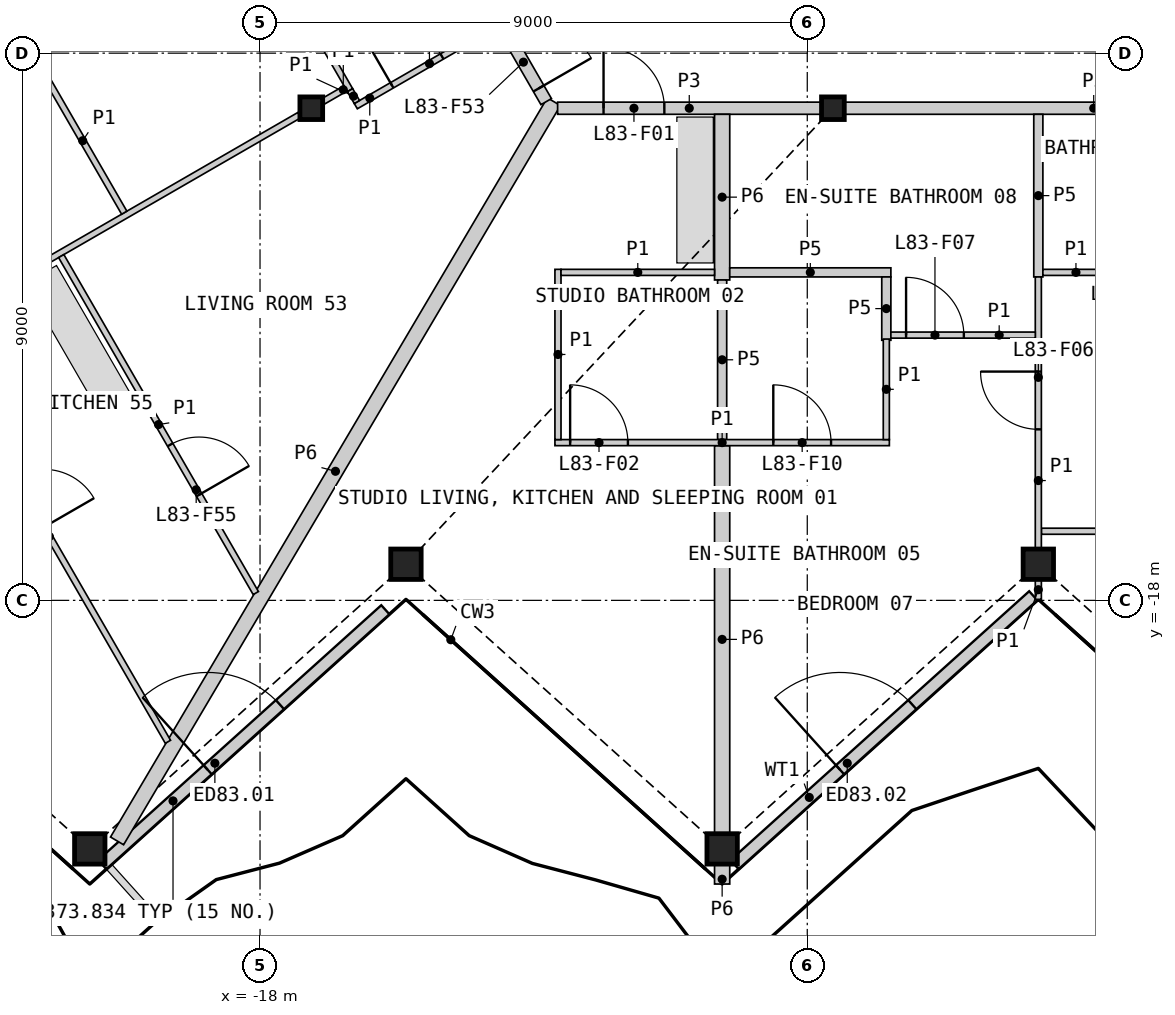
"""IFC4 building model, lengths in metres.
Left out: names, types, materials, properties, quantities, classifications, styles, units other than length and angle.
Written with IfcOpenShell. Run it as: python <this file> out.ifc"""

import sys

from ifc_helpers import new_model, si_unit, direction, frame, frame_2d, origin, origin_2d, place, context, subcontext, project, spatial, rectangle, hollow_rectangle, i_section, extrude, element, fill, save


model = new_model("IFC4")
c1 = context("Model", 3, precision=1e-05, world=origin(), true_north=direction((0.0, 1.0)))
c2 = subcontext(c1, "Body", "Model", "MODEL_VIEW")
j1 = project(units=[si_unit("LENGTHUNIT", "METRE"), si_unit("PLANEANGLEUNIT", "RADIAN")], contexts=[c1])
p1 = place(None, origin())
s1 = spatial("IfcSite", under=j1, at=p1, CompositionType="ELEMENT")
p2 = place(p1, origin())
s2 = spatial("IfcBuilding", under=s1, at=p2, CompositionType="ELEMENT")
p3 = place(p2, frame((0.0, 0.0, 371.2)))
s3 = spatial("IfcBuildingStorey", under=s2, at=p3, CompositionType="ELEMENT", Elevation=371.2)
for number, where, z_axis, x_axis in (
    (1, (-20.8, -22.088, 0.0), (0.0, 0.0, 1.0), (1.0, 0.0, 0.0)),
    (2, (-15.6, -17.406, 0.0), (0.0, 0.0, 1.0), (1.0, 0.0, 0.0)),
    (3, (-10.4, -22.088, 0.0), (0.0, 0.0, 1.0), (1.0, 0.0, 0.0)),
    (4, (-5.2, -17.406, 0.0), (0.0, 0.0, 1.0), (1.0, 0.0, 0.0)),
):
    element("IfcColumn", number, at=place(p3, frame(where, z_axis=z_axis, x_axis=x_axis)), inside=s3, PredefinedType="COLUMN", context=c2, shape_type="SweptSolid", body=[
        extrude(hollow_rectangle(XDim=0.5, YDim=0.5, WallThickness=0.03, at=origin_2d()), origin(), (0.0, 0.0, 1.0), 3.4),
    ])
for number, where, z_axis, x_axis in (
    (5, (-17.157, -9.906, 0.0), (0.0, 0.0, 1.0), (1.0, 0.0, 0.0)),
    (6, (-8.578, -9.906, 0.0), (0.0, 0.0, 1.0), (1.0, 0.0, 0.0)),
):
    element("IfcColumn", number, at=place(p3, frame(where, z_axis=z_axis, x_axis=x_axis)), inside=s3, PredefinedType="COLUMN", context=c2, shape_type="SweptSolid", body=[
        extrude(i_section(OverallWidth=0.374, OverallDepth=0.372, WebThickness=0.016, FlangeThickness=0.026, at=origin_2d()), origin(), (0.0, 0.0, 1.0), 3.4),
    ])
p4 = place(p3, frame((-20.595, -22.346, 0.0), z_axis=(0.0, 0.0, 1.0), x_axis=(0.743137181878, 0.669139095339, 0.0)))
e7 = element("IfcWall", 7, at=p4, inside=s3, PredefinedType="SOLIDWALL", context=c2, shape_type="SweptSolid", body=[
    extrude(rectangle(XDim=6.265, YDim=0.2, at=frame_2d((3.133, 0.0))), origin(), (0.0, 0.0, 1.0), 2.634),
])
p5 = place(p4, frame((2.333, 0.0, 0.0)))
e8 = element("IfcOpeningElement", 8, at=p5, cuts=e7, PredefinedType="OPENING", context=c2, shape_type="SweptSolid", body=[
    extrude(rectangle(XDim=1.6, YDim=2.25, at=frame_2d((0.8, 1.125))), frame((0.0, 0.11, 0.0), z_axis=(0.0, -1.0, 0.0), x_axis=(1.0, 0.0, 0.0)), (0.0, 0.0, 1.0), 0.22),
])
p6 = place(p3, frame((-10.195, -22.346, 0.0), z_axis=(0.0, 0.0, 1.0), x_axis=(0.74313432117, 0.66914227239, 0.0)))
e9 = element("IfcWall", 9, at=p6, inside=s3, PredefinedType="SOLIDWALL", context=c2, shape_type="SweptSolid", body=[
    extrude(rectangle(XDim=6.609, YDim=0.2, at=frame_2d((3.304, 0.0))), origin(), (0.0, 0.0, 1.0), 2.634),
])
p7 = place(p6, frame((2.333, 0.0, 0.0)))
e10 = element("IfcOpeningElement", 10, at=p7, cuts=e9, PredefinedType="OPENING", context=c2, shape_type="SweptSolid", body=[
    extrude(rectangle(XDim=1.6, YDim=2.25, at=frame_2d((0.8, 1.125))), frame((0.0, 0.11, 0.0), z_axis=(0.0, -1.0, 0.0), x_axis=(1.0, 0.0, 0.0)), (0.0, 0.0, 1.0), 0.22),
])
p8 = place(p3, frame((-20.351, -21.956, 0.0), z_axis=(0.0, 0.0, 1.0), x_axis=(0.508713003719, 0.860936164793, 0.0)))
e11 = element("IfcWall", 11, at=p8, inside=s3, PredefinedType="PARTITIONING", context=c2, shape_type="SweptSolid", body=[
    extrude(rectangle(XDim=14.122, YDim=0.25, at=frame_2d((7.061, 0.0))), origin(), (0.0, 0.0, 1.0), 2.33),
])
p9 = place(p3, frame((-8.382, -9.906, 0.0), z_axis=(0.0, 0.0, 1.0), x_axis=(1.0, 0.0, 0.0)))
e12 = element("IfcWall", 12, at=p9, inside=s3, PredefinedType="PARTITIONING", context=c2, shape_type="SweptSolid", body=[
    extrude(rectangle(XDim=8.185, YDim=0.2, at=frame_2d((4.092, 0.0))), origin(), (0.0, 0.0, 1.0), 3.1),
])
p10 = place(p9, frame((6.023, 0.0, 0.0)))
e13 = element("IfcOpeningElement", 13, at=p10, cuts=e12, PredefinedType="OPENING", context=c2, shape_type="SweptSolid", body=[
    extrude(rectangle(XDim=1.0, YDim=2.1, at=frame_2d((0.5, 1.05))), frame((0.0, 0.11, 0.0), z_axis=(0.0, -1.0, 0.0), x_axis=(1.0, 0.0, 0.0)), (0.0, 0.0, 1.0), 0.22),
])
p11 = place(p3, frame((-10.4, -21.828, 0.0), z_axis=(0.0, 0.0, 1.0), x_axis=(0.0, 1.0, 0.0)))
e14 = element("IfcWall", 14, at=p11, inside=s3, PredefinedType="PARTITIONING", context=c2, shape_type="SweptSolid", body=[
    extrude(rectangle(XDim=6.372, YDim=0.25, at=frame_2d((3.186, 0.0))), origin(), (0.0, 0.0, 1.0), 2.33),
])
p12 = place(p3, frame((-13.106, -9.906, 0.0), z_axis=(0.0, 0.0, 1.0), x_axis=(1.0, 0.0, 0.0)))
e15 = element("IfcWall", 15, at=p12, inside=s3, PredefinedType="PARTITIONING", context=c2, shape_type="SweptSolid", body=[
    extrude(rectangle(XDim=4.331, YDim=0.2, at=frame_2d((2.165, 0.0))), origin(), (0.0, 0.0, 1.0), 3.1),
])
p13 = place(p12, frame((0.755, 0.0, 0.0)))
e16 = element("IfcOpeningElement", 16, at=p13, cuts=e15, PredefinedType="OPENING", context=c2, shape_type="SweptSolid", body=[
    extrude(rectangle(XDim=1.0, YDim=2.1, at=frame_2d((0.5, 1.05))), frame((0.0, 0.11, 0.0), z_axis=(0.0, -1.0, 0.0), x_axis=(1.0, 0.0, 0.0)), (0.0, 0.0, 1.0), 0.22),
])
p14 = place(p3, frame((-15.131, -6.614, 0.0), z_axis=(0.0, 0.0, 1.0), x_axis=(0.499967746641, -0.866044024469, 0.0)))
e17 = element("IfcWall", 17, at=p14, inside=s3, PredefinedType="PARTITIONING", context=c2, shape_type="SweptSolid", body=[
    extrude(rectangle(XDim=3.676, YDim=0.2, at=frame_2d((1.838, 0.0))), origin(), (0.0, 0.0, 1.0), 3.1),
])
p15 = place(p14, frame((2.426, 0.0, 0.0)))
e18 = element("IfcOpeningElement", 18, at=p15, cuts=e17, PredefinedType="OPENING", context=c2, shape_type="SweptSolid", body=[
    extrude(rectangle(XDim=1.0, YDim=2.1, at=frame_2d((0.5, 1.05))), frame((0.0, 0.11, 0.0), z_axis=(0.0, -1.0, 0.0), x_axis=(1.0, 0.0, 0.0)), (0.0, 0.0, 1.0), 0.22),
])
p16 = place(p3, frame((-10.4, -12.731, 0.0), z_axis=(0.0, 0.0, 1.0), x_axis=(0.0, 1.0, 0.0)))
e19 = element("IfcWall", 19, at=p16, inside=s3, PredefinedType="PARTITIONING", context=c2, shape_type="SweptSolid", body=[
    extrude(rectangle(XDim=2.725, YDim=0.25, at=frame_2d((1.363, 0.0))), origin(), (0.0, 0.0, 1.0), 2.33),
])
p17 = place(p3, frame((-10.4, -22.666, 0.0), z_axis=(0.0, 0.0, 1.0), x_axis=(0.0, 1.0, 0.0)))
e20 = element("IfcWall", 20, at=p17, inside=s3, PredefinedType="PARTITIONING", context=c2, shape_type="SweptSolid", body=[
    extrude(rectangle(XDim=0.318, YDim=0.25, at=frame_2d((0.159, 0.0))), origin(), (0.0, 0.0, 1.0), 2.33),
])
p18 = place(p3, frame((-10.4, -15.356, 0.0), z_axis=(0.0, 0.0, 1.0), x_axis=(0.0, 1.0, 0.0)))
e21 = element("IfcWall", 21, at=p18, inside=s3, PredefinedType="PLUMBINGWALL", context=c2, shape_type="SweptSolid", body=[
    extrude(rectangle(XDim=2.625, YDim=0.15, at=frame_2d((1.312, 0.0))), origin(), (0.0, 0.0, 1.0), 2.33),
])
p19 = place(p3, frame((-5.2, -12.681, 0.0), z_axis=(0.0, 0.0, 1.0), x_axis=(0.0, 1.0, 0.0)))
e22 = element("IfcWall", 22, at=p19, inside=s3, PredefinedType="PLUMBINGWALL", context=c2, shape_type="SweptSolid", body=[
    extrude(rectangle(XDim=2.675, YDim=0.15, at=frame_2d((1.337, 0.0))), origin(), (0.0, 0.0, 1.0), 2.33),
])
p20 = place(p3, frame((-10.275, -12.606, 0.0), z_axis=(0.0, 0.0, 1.0), x_axis=(1.0, 0.0, 0.0)))
e23 = element("IfcWall", 23, at=p20, inside=s3, PredefinedType="PLUMBINGWALL", context=c2, shape_type="SweptSolid", body=[
    extrude(rectangle(XDim=2.65, YDim=0.15, at=frame_2d((1.325, 0.0))), origin(), (0.0, 0.0, 1.0), 2.33),
])
p21 = place(p3, frame((-7.7, -13.722, 0.0), z_axis=(0.0, 0.0, 1.0), x_axis=(0.0, 1.0, 0.0)))
e24 = element("IfcWall", 24, at=p21, inside=s3, PredefinedType="PLUMBINGWALL", context=c2, shape_type="SweptSolid", body=[
    extrude(rectangle(XDim=1.042, YDim=0.15, at=frame_2d((0.521, 0.0))), origin(), (0.0, 0.0, 1.0), 2.33),
])
p22 = place(p3, frame((-26.777, -15.46, 0.0), z_axis=(0.0, 0.0, 1.0), x_axis=(0.866019680922, 0.500009912158, 0.0)))
e25 = element("IfcWall", 25, at=p22, inside=s3, PredefinedType="PARTITIONING", context=c2, shape_type="SweptSolid", body=[
    extrude(rectangle(XDim=10.881, YDim=0.1, at=frame_2d((5.44, 0.0))), origin(), (0.0, 0.0, 1.0), 2.33),
])
p23 = place(p22, frame((1.454, 0.0, 0.0)))
e26 = element("IfcOpeningElement", 26, at=p23, cuts=e25, PredefinedType="OPENING", context=c2, shape_type="SweptSolid", body=[
    extrude(rectangle(XDim=0.95, YDim=2.1, at=frame_2d((0.475, 1.05))), frame((0.0, 0.06, 0.0), z_axis=(0.0, -1.0, 0.0), x_axis=(1.0, 0.0, 0.0)), (0.0, 0.0, 1.0), 0.12),
])
p24 = place(p3, frame((-23.413, -13.575, 0.0), z_axis=(0.0, 0.0, 1.0), x_axis=(0.499998958472, -0.86602600511, 0.0)))
e27 = element("IfcWall", 27, at=p24, inside=s3, PredefinedType="PARTITIONING", context=c2, shape_type="SweptSolid", body=[
    extrude(rectangle(XDim=7.796, YDim=0.1, at=frame_2d((3.898, 0.0))), origin(), (0.0, 0.0, 1.0), 2.33),
])
p25 = place(p24, frame((2.768, 0.0, 0.0)))
e28 = element("IfcOpeningElement", 28, at=p25, cuts=e27, PredefinedType="OPENING", context=c2, shape_type="SweptSolid", body=[
    extrude(rectangle(XDim=0.95, YDim=2.1, at=frame_2d((0.475, 1.05))), frame((0.0, 0.06, 0.0), z_axis=(0.0, -1.0, 0.0), x_axis=(1.0, 0.0, 0.0)), (0.0, 0.0, 1.0), 0.12),
])
p26 = place(p3, frame((-21.269, -12.337, 0.0), z_axis=(0.0, 0.0, 1.0), x_axis=(0.499983315828, -0.866035036182, 0.0)))
e29 = element("IfcWall", 29, at=p26, inside=s3, PredefinedType="PARTITIONING", context=c2, shape_type="SweptSolid", body=[
    extrude(rectangle(XDim=6.4, YDim=0.1, at=frame_2d((3.2, 0.0))), origin(), (0.0, 0.0, 1.0), 2.33),
])
p27 = place(p26, frame((3.584, 0.0, 0.0)))
e30 = element("IfcOpeningElement", 30, at=p27, cuts=e29, PredefinedType="OPENING", context=c2, shape_type="SweptSolid", body=[
    extrude(rectangle(XDim=0.95, YDim=2.1, at=frame_2d((0.475, 1.05))), frame((0.0, 0.06, 0.0), z_axis=(0.0, -1.0, 0.0), x_axis=(1.0, 0.0, 0.0)), (0.0, 0.0, 1.0), 0.12),
])
p28 = place(p3, frame((-13.15, -15.406, 0.0), z_axis=(0.0, 0.0, 1.0), x_axis=(1.0, 0.0, 0.0)))
e31 = element("IfcWall", 31, at=p28, inside=s3, PredefinedType="PARTITIONING", context=c2, shape_type="SweptSolid", body=[
    extrude(rectangle(XDim=5.5, YDim=0.1, at=frame_2d((2.75, 0.0))), origin(), (0.0, 0.0, 1.0), 2.33),
])
p29 = place(p28, frame((0.25, 0.0, 0.0)))
e32 = element("IfcOpeningElement", 32, at=p29, cuts=e31, PredefinedType="OPENING", context=c2, shape_type="SweptSolid", body=[
    extrude(rectangle(XDim=0.95, YDim=2.1, at=frame_2d((0.475, 1.05))), frame((0.0, 0.06, 0.0), z_axis=(0.0, -1.0, 0.0), x_axis=(1.0, 0.0, 0.0)), (0.0, 0.0, 1.0), 0.12),
])
p30 = place(p28, frame((3.591, 0.0, 0.0)))
e33 = element("IfcOpeningElement", 33, at=p30, cuts=e31, PredefinedType="OPENING", context=c2, shape_type="SweptSolid", body=[
    extrude(rectangle(XDim=0.95, YDim=2.1, at=frame_2d((0.475, 1.05))), frame((0.0, 0.06, 0.0), z_axis=(0.0, -1.0, 0.0), x_axis=(1.0, 0.0, 0.0)), (0.0, 0.0, 1.0), 0.12),
])
p31 = place(p3, frame((-5.15, -16.863, 0.0), z_axis=(0.0, 0.0, 1.0), x_axis=(1.0, 0.0, 0.0)))
e34 = element("IfcWall", 34, at=p31, inside=s3, PredefinedType="PARTITIONING", context=c2, shape_type="SweptSolid", body=[
    extrude(rectangle(XDim=5.1, YDim=0.1, at=frame_2d((2.55, 0.0))), origin(), (0.0, 0.0, 1.0), 2.33),
])
p32 = place(p31, frame((2.075, 0.0, 0.0)))
e35 = element("IfcOpeningElement", 35, at=p32, cuts=e34, PredefinedType="OPENING", context=c2, shape_type="SweptSolid", body=[
    extrude(rectangle(XDim=0.95, YDim=2.1, at=frame_2d((0.475, 1.05))), frame((0.0, 0.06, 0.0), z_axis=(0.0, -1.0, 0.0), x_axis=(1.0, 0.0, 0.0)), (0.0, 0.0, 1.0), 0.12),
])
p33 = place(p3, frame((-5.2, -17.146, 0.0), z_axis=(0.0, 0.0, 1.0), x_axis=(0.0, 1.0, 0.0)))
e36 = element("IfcWall", 36, at=p33, inside=s3, PredefinedType="PARTITIONING", context=c2, shape_type="SweptSolid", body=[
    extrude(rectangle(XDim=4.465, YDim=0.1, at=frame_2d((2.232, 0.0))), origin(), (0.0, 0.0, 1.0), 2.33),
])
p34 = place(p33, frame((1.958, 0.0, 0.0)))
e37 = element("IfcOpeningElement", 37, at=p34, cuts=e36, PredefinedType="OPENING", context=c2, shape_type="SweptSolid", body=[
    extrude(rectangle(XDim=0.95, YDim=2.1, at=frame_2d((0.475, 1.05))), frame((0.0, 0.06, 0.0), z_axis=(0.0, -1.0, 0.0), x_axis=(1.0, 0.0, 0.0)), (0.0, 0.0, 1.0), 0.12),
])
p35 = place(p3, frame((-21.6, -9.256, 0.0), z_axis=(0.0, 0.0, 1.0), x_axis=(0.500018733116, -0.866014587945, 0.0)))
e38 = element("IfcWall", 38, at=p35, inside=s3, PredefinedType="PARTITIONING", context=c2, shape_type="SweptSolid", body=[
    extrude(rectangle(XDim=2.734, YDim=0.1, at=frame_2d((1.367, 0.0))), origin(), (0.0, 0.0, 1.0), 2.33),
])
p36 = place(p3, frame((-13.1, -15.356, 0.0), z_axis=(0.0, 0.0, 1.0), x_axis=(0.0, 1.0, 0.0)))
e39 = element("IfcWall", 39, at=p36, inside=s3, PredefinedType="PARTITIONING", context=c2, shape_type="SweptSolid", body=[
    extrude(rectangle(XDim=2.8, YDim=0.1, at=frame_2d((1.4, 0.0))), origin(), (0.0, 0.0, 1.0), 2.33),
])
p37 = place(p3, frame((-13.05, -12.606, 0.0), z_axis=(0.0, 0.0, 1.0), x_axis=(1.0, 0.0, 0.0)))
e40 = element("IfcWall", 40, at=p37, inside=s3, PredefinedType="PARTITIONING", context=c2, shape_type="SweptSolid", body=[
    extrude(rectangle(XDim=2.525, YDim=0.1, at=frame_2d((1.263, 0.0))), origin(), (0.0, 0.0, 1.0), 2.33),
])
p38 = place(p3, frame((-16.425, -9.872, 0.0), z_axis=(0.0, 0.0, 1.0), x_axis=(0.86603978909, 0.499975083092, 0.0)))
e41 = element("IfcWall", 41, at=p38, inside=s3, PredefinedType="PARTITIONING", context=c2, shape_type="SweptSolid", body=[
    extrude(rectangle(XDim=2.649, YDim=0.1, at=frame_2d((1.325, 0.0))), origin(), (0.0, 0.0, 1.0), 2.33),
])
p39 = place(p38, frame((0.686, 0.0, 0.0)))
e42 = element("IfcOpeningElement", 42, at=p39, cuts=e41, PredefinedType="OPENING", context=c2, shape_type="SweptSolid", body=[
    extrude(rectangle(XDim=0.95, YDim=2.1, at=frame_2d((0.475, 1.05))), frame((0.0, 0.06, 0.0), z_axis=(0.0, -1.0, 0.0), x_axis=(1.0, 0.0, 0.0)), (0.0, 0.0, 1.0), 0.12),
])
p40 = place(p3, frame((-7.625, -13.637, 0.0), z_axis=(0.0, 0.0, 1.0), x_axis=(1.0, 0.0, 0.0)))
e43 = element("IfcWall", 43, at=p40, inside=s3, PredefinedType="PARTITIONING", context=c2, shape_type="SweptSolid", body=[
    extrude(rectangle(XDim=2.375, YDim=0.1, at=frame_2d((1.188, 0.0))), origin(), (0.0, 0.0, 1.0), 2.33),
])
p41 = place(p40, frame((0.25, 0.0, 0.0)))
e44 = element("IfcOpeningElement", 44, at=p41, cuts=e43, PredefinedType="OPENING", context=c2, shape_type="SweptSolid", body=[
    extrude(rectangle(XDim=0.95, YDim=2.1, at=frame_2d((0.475, 1.05))), frame((0.0, 0.06, 0.0), z_axis=(0.0, -1.0, 0.0), x_axis=(1.0, 0.0, 0.0)), (0.0, 0.0, 1.0), 0.12),
])
p42 = place(p3, frame((-5.125, -12.606, 0.0), z_axis=(0.0, 0.0, 1.0), x_axis=(1.0, 0.0, 0.0)))
e45 = element("IfcWall", 45, at=p42, inside=s3, PredefinedType="PARTITIONING", context=c2, shape_type="SweptSolid", body=[
    extrude(rectangle(XDim=2.175, YDim=0.1, at=frame_2d((1.087, 0.0))), origin(), (0.0, 0.0, 1.0), 2.33),
])
p43 = place(p42, frame((0.975, 0.0, 0.0)))
e46 = element("IfcOpeningElement", 46, at=p43, cuts=e45, PredefinedType="OPENING", context=c2, shape_type="SweptSolid", body=[
    extrude(rectangle(XDim=0.95, YDim=2.1, at=frame_2d((0.475, 1.05))), frame((0.0, 0.06, 0.0), z_axis=(0.0, -1.0, 0.0), x_axis=(1.0, 0.0, 0.0)), (0.0, 0.0, 1.0), 0.12),
])
p44 = place(p3, frame((-17.507, -7.899, 0.0), z_axis=(0.0, 0.0, 1.0), x_axis=(0.500011643316, -0.866018681408, 0.0)))
e47 = element("IfcWall", 47, at=p44, inside=s3, PredefinedType="PARTITIONING", context=c2, shape_type="SweptSolid", body=[
    extrude(rectangle(XDim=1.973, YDim=0.1, at=frame_2d((0.987, 0.0))), origin(), (0.0, 0.0, 1.0), 2.33),
])
p45 = place(p3, frame((-7.7, -15.356, 0.0), z_axis=(0.0, 0.0, 1.0), x_axis=(0.0, 1.0, 0.0)))
e48 = element("IfcWall", 48, at=p45, inside=s3, PredefinedType="PARTITIONING", context=c2, shape_type="SweptSolid", body=[
    extrude(rectangle(XDim=1.654, YDim=0.1, at=frame_2d((0.827, 0.0))), origin(), (0.0, 0.0, 1.0), 2.33),
])
p46 = place(p3, frame((-16.96, -9.792, 0.0), z_axis=(0.0, 0.0, 1.0), x_axis=(0.866137484628, 0.499805820016, 0.0)))
e49 = element("IfcWall", 49, at=p46, inside=s3, PredefinedType="PARTITIONING", context=c2, shape_type="SweptSolid", body=[
    extrude(rectangle(XDim=0.423, YDim=0.1, at=frame_2d((0.211, 0.0))), origin(), (0.0, 0.0, 1.0), 2.33),
])
p47 = place(p3, frame((-5.2, -17.983, 0.0), z_axis=(0.0, 0.0, 1.0), x_axis=(0.0, 1.0, 0.0)))
e50 = element("IfcWall", 50, at=p47, inside=s3, PredefinedType="PARTITIONING", context=c2, shape_type="SweptSolid", body=[
    extrude(rectangle(XDim=0.318, YDim=0.1, at=frame_2d((0.159, 0.0))), origin(), (0.0, 0.0, 1.0), 2.33),
])
p48 = place(p3, frame((-16.519, -9.61, 0.0), z_axis=(0.0, 0.0, 1.0), x_axis=(0.50245032488, -0.864606078528, 0.0)))
e51 = element("IfcWall", 51, at=p48, inside=s3, PredefinedType="PARTITIONING", context=c2, shape_type="SweptSolid", body=[
    extrude(rectangle(XDim=0.224, YDim=0.1, at=frame_2d((0.112, 0.0))), origin(), (0.0, 0.0, 1.0), 2.33),
])
p49 = place(p5, origin())
e52 = element("IfcDoor", 52, at=p49, inside=s3, OperationType="DOUBLE_DOOR_SINGLE_SWING", PredefinedType="DOOR", context=c2, shape_type="SweptSolid", body=[
    extrude(rectangle(XDim=1.6, YDim=2.25, at=frame_2d((0.8, 1.125))), frame((0.0, 0.025, 0.0), z_axis=(0.0, -1.0, 0.0), x_axis=(1.0, 0.0, 0.0)), (0.0, 0.0, 1.0), 0.05),
])
fill(e8, e52)
p50 = place(p7, origin())
e53 = element("IfcDoor", 53, at=p50, inside=s3, OperationType="DOUBLE_DOOR_SINGLE_SWING", PredefinedType="DOOR", context=c2, shape_type="SweptSolid", body=[
    extrude(rectangle(XDim=1.6, YDim=2.25, at=frame_2d((0.8, 1.125))), frame((0.0, 0.025, 0.0), z_axis=(0.0, -1.0, 0.0), x_axis=(1.0, 0.0, 0.0)), (0.0, 0.0, 1.0), 0.05),
])
fill(e10, e53)
p51 = place(p13, origin())
e54 = element("IfcDoor", 54, at=p51, inside=s3, OperationType="SINGLE_SWING_LEFT", PredefinedType="DOOR", context=c2, shape_type="SweptSolid", body=[
    extrude(rectangle(XDim=1.0, YDim=2.1, at=frame_2d((0.5, 1.05))), frame((0.0, 0.025, 0.0), z_axis=(0.0, -1.0, 0.0), x_axis=(1.0, 0.0, 0.0)), (0.0, 0.0, 1.0), 0.05),
])
fill(e16, e54)
p52 = place(p29, origin())
e55 = element("IfcDoor", 55, at=p52, inside=s3, OperationType="SINGLE_SWING_LEFT", PredefinedType="DOOR", context=c2, shape_type="SweptSolid", body=[
    extrude(rectangle(XDim=0.95, YDim=2.1, at=frame_2d((0.475, 1.05))), frame((0.0, 0.025, 0.0), z_axis=(0.0, -1.0, 0.0), x_axis=(1.0, 0.0, 0.0)), (0.0, 0.0, 1.0), 0.05),
])
fill(e32, e55)
p53 = place(p34, origin())
e56 = element("IfcDoor", 56, at=p53, inside=s3, OperationType="SINGLE_SWING_RIGHT", PredefinedType="DOOR", context=c2, shape_type="SweptSolid", body=[
    extrude(rectangle(XDim=0.95, YDim=2.1, at=frame_2d((0.475, 1.05))), frame((0.0, 0.025, 0.0), z_axis=(0.0, -1.0, 0.0), x_axis=(1.0, 0.0, 0.0)), (0.0, 0.0, 1.0), 0.05),
])
fill(e37, e56)
p54 = place(p41, origin())
e57 = element("IfcDoor", 57, at=p54, inside=s3, OperationType="SINGLE_SWING_LEFT", PredefinedType="DOOR", context=c2, shape_type="SweptSolid", body=[
    extrude(rectangle(XDim=0.95, YDim=2.1, at=frame_2d((0.475, 1.05))), frame((0.0, 0.025, 0.0), z_axis=(0.0, -1.0, 0.0), x_axis=(1.0, 0.0, 0.0)), (0.0, 0.0, 1.0), 0.05),
])
fill(e44, e57)
p55 = place(p30, origin())
e58 = element("IfcDoor", 58, at=p55, inside=s3, OperationType="SINGLE_SWING_LEFT", PredefinedType="DOOR", context=c2, shape_type="SweptSolid", body=[
    extrude(rectangle(XDim=0.95, YDim=2.1, at=frame_2d((0.475, 1.05))), frame((0.0, 0.025, 0.0), z_axis=(0.0, -1.0, 0.0), x_axis=(1.0, 0.0, 0.0)), (0.0, 0.0, 1.0), 0.05),
])
fill(e33, e58)
p56 = place(p15, origin())
e59 = element("IfcDoor", 59, at=p56, inside=s3, OperationType="SINGLE_SWING_RIGHT", PredefinedType="DOOR", context=c2, shape_type="SweptSolid", body=[
    extrude(rectangle(XDim=1.0, YDim=2.1, at=frame_2d((0.5, 1.05))), frame((0.0, 0.025, 0.0), z_axis=(0.0, -1.0, 0.0), x_axis=(1.0, 0.0, 0.0)), (0.0, 0.0, 1.0), 0.05),
])
fill(e18, e59)
p57 = place(p39, origin())
e60 = element("IfcDoor", 60, at=p57, inside=s3, OperationType="SINGLE_SWING_LEFT", PredefinedType="DOOR", context=c2, shape_type="SweptSolid", body=[
    extrude(rectangle(XDim=0.95, YDim=2.1, at=frame_2d((0.475, 1.05))), frame((0.0, 0.025, 0.0), z_axis=(0.0, -1.0, 0.0), x_axis=(1.0, 0.0, 0.0)), (0.0, 0.0, 1.0), 0.05),
])
fill(e42, e60)
p58 = place(p27, origin())
e61 = element("IfcDoor", 61, at=p58, inside=s3, OperationType="SINGLE_SWING_RIGHT", PredefinedType="DOOR", context=c2, shape_type="SweptSolid", body=[
    extrude(rectangle(XDim=0.95, YDim=2.1, at=frame_2d((0.475, 1.05))), frame((0.0, 0.025, 0.0), z_axis=(0.0, -1.0, 0.0), x_axis=(1.0, 0.0, 0.0)), (0.0, 0.0, 1.0), 0.05),
])
fill(e30, e61)
save(model, sys.argv[1])
